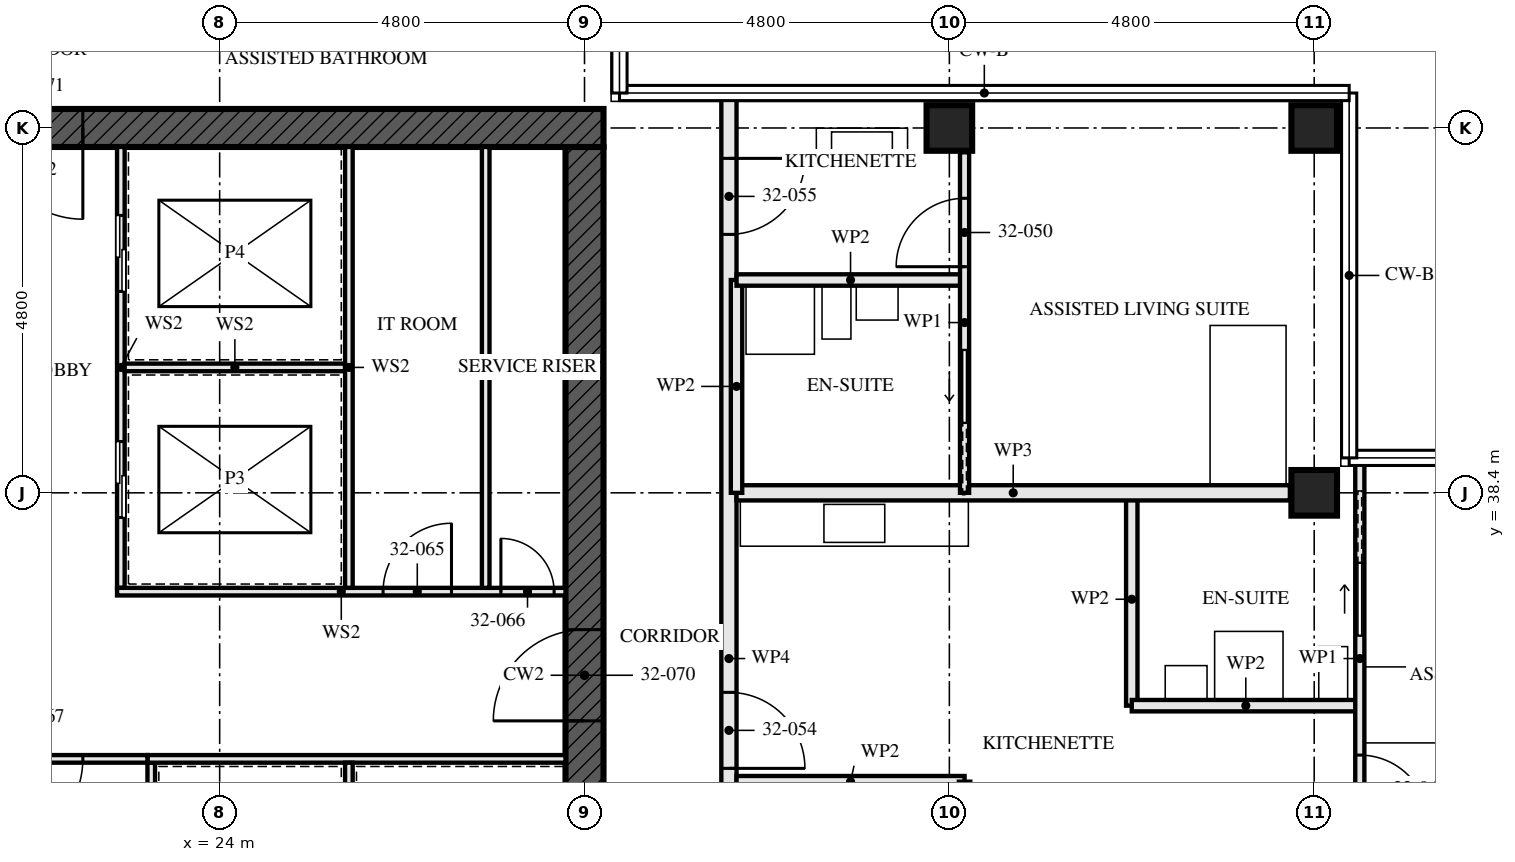
"""IFC4 building model, lengths in metres.
Left out: names, types, materials, properties, quantities, classifications, styles, units other than length and angle.
Written with IfcOpenShell. Run it as: python <this file> out.ifc"""

import sys

from ifc_helpers import new_model, si_unit, direction, frame, frame_2d, origin, origin_2d, place, context, subcontext, project, spatial, rectangle, hollow_rectangle, extrude, element, fill, save


model = new_model("IFC4")
c1 = context("Model", 3, precision=1e-05, world=origin(), true_north=direction((0.0, 1.0)))
c2 = subcontext(c1, "Body", "Model", "MODEL_VIEW")
j1 = project(units=[si_unit("LENGTHUNIT", "METRE"), si_unit("PLANEANGLEUNIT", "RADIAN")], contexts=[c1])
p1 = place(None, origin())
s1 = spatial("IfcSite", under=j1, at=p1, CompositionType="ELEMENT")
p2 = place(p1, origin())
s2 = spatial("IfcBuilding", under=s1, at=p2, CompositionType="ELEMENT")
p3 = place(p2, frame((0.0, 0.0, 119.0)))
s3 = spatial("IfcBuildingStorey", under=s2, at=p3, CompositionType="ELEMENT", Elevation=119.0)
for number, where, z_axis, x_axis in (
    (1, (33.6, 43.2, 0.0), (0.0, 0.0, 1.0), (0.0, 1.0, 0.0)),
    (2, (38.4, 38.4, 0.0), (0.0, 0.0, 1.0), (0.0, 1.0, 0.0)),
    (3, (38.4, 43.2, 0.0), (0.0, 0.0, 1.0), (0.0, 1.0, 0.0)),
):
    element("IfcColumn", number, at=place(p3, frame(where, z_axis=z_axis, x_axis=x_axis)), inside=s3, PredefinedType="COLUMN", context=c2, shape_type="SweptSolid", body=[
        extrude(hollow_rectangle(XDim=0.6, YDim=0.6, WallThickness=0.08, at=origin_2d()), origin(), (0.0, 0.0, 1.0), 3.5),
    ])
p4 = place(p3, frame((29.05, 43.2, -0.17), z_axis=(0.0, 0.0, 1.0), x_axis=(-1.0, 0.0, 0.0)))
e4 = element("IfcWall", 4, at=p4, inside=s3, PredefinedType="SHEAR", context=c2, shape_type="SweptSolid", body=[
    extrude(rectangle(XDim=14.9, YDim=0.5, at=frame_2d((7.45, 0.0))), origin(), (0.0, 0.0, 1.0), 3.5),
])
p5 = place(p4, frame((6.85, 0.0, 0.17)))
e5 = element("IfcOpeningElement", 5, at=p5, cuts=e4, PredefinedType="OPENING", context=c2, shape_type="SweptSolid", body=[
    extrude(rectangle(XDim=1.2, YDim=2.1, at=frame_2d((0.6, 1.05))), frame((0.0, 0.26, 0.0), z_axis=(0.0, -1.0, 0.0), x_axis=(1.0, 0.0, 0.0)), (0.0, 0.0, 1.0), 0.521),
])
p6 = place(p3, frame((28.8, 29.05, -0.17), z_axis=(0.0, 0.0, 1.0), x_axis=(0.0, 1.0, 0.0)))
e6 = element("IfcWall", 6, at=p6, inside=s3, PredefinedType="SHEAR", context=c2, shape_type="SweptSolid", body=[
    extrude(rectangle(XDim=13.9, YDim=0.5, at=frame_2d((6.95, 0.0))), origin(), (0.0, 0.0, 1.0), 3.5),
])
p7 = place(p6, frame((6.35, 0.0, 0.17)))
e7 = element("IfcOpeningElement", 7, at=p7, cuts=e6, PredefinedType="OPENING", context=c2, shape_type="SweptSolid", body=[
    extrude(rectangle(XDim=1.2, YDim=2.1, at=frame_2d((0.6, 1.05))), frame((0.0, 0.26, 0.0), z_axis=(0.0, -1.0, 0.0), x_axis=(1.0, 0.0, 0.0)), (0.0, 0.0, 1.0), 0.521),
])
p8 = place(p3, frame((33.8, 32.2, 0.0), z_axis=(0.0, 0.0, 1.0), x_axis=(0.0, 1.0, 0.0)))
e8 = element("IfcWall", 8, at=p8, inside=s3, PredefinedType="PARTITIONING", context=c2, shape_type="SweptSolid", body=[
    extrude(rectangle(XDim=2.4, YDim=0.15, at=frame_2d((1.2, 0.0))), origin(), (0.0, 0.0, 1.0), 2.55),
])
for number, where, z_axis, x_axis in (
    (9, (33.8, 34.6, 0.0), (0.0, 0.0, 1.0), (-1.0, 0.0, 0.0)),
    (10, (39.0, 35.6, 0.0), (0.0, 0.0, 1.0), (-1.0, 0.0, 0.0)),
):
    element("IfcWall", number, at=place(p3, frame(where, z_axis=z_axis, x_axis=x_axis)), inside=s3, PredefinedType="PARTITIONING", context=c2, shape_type="SweptSolid", body=[
        extrude(rectangle(XDim=3.0, YDim=0.15, at=frame_2d((1.5, 0.0))), origin(), (0.0, 0.0, 1.0), 3.33),
    ])
p9 = place(p3, frame((36.0, 35.6, 0.0), z_axis=(0.0, 0.0, 1.0), x_axis=(0.0, 1.0, 0.0)))
e11 = element("IfcWall", 11, at=p9, inside=s3, PredefinedType="PARTITIONING", context=c2, shape_type="SweptSolid", body=[
    extrude(rectangle(XDim=2.8, YDim=0.15, at=frame_2d((1.4, 0.0))), origin(), (0.0, 0.0, 1.0), 3.33),
])
p10 = place(p3, frame((39.0, 33.6, 0.0), z_axis=(0.0, 0.0, 1.0), x_axis=(0.0, 1.0, 0.0)))
e12 = element("IfcWall", 12, at=p10, inside=s3, PredefinedType="PARTITIONING", context=c2, shape_type="SweptSolid", body=[
    extrude(rectangle(XDim=5.24, YDim=0.12, at=frame_2d((2.62, 0.0))), origin(), (0.0, 0.0, 1.0), 2.32),
])
p11 = place(p10, frame((0.45, 0.0, 0.0)))
e13 = element("IfcOpeningElement", 13, at=p11, cuts=e12, PredefinedType="OPENING", context=c2, shape_type="SweptSolid", body=[
    extrude(rectangle(XDim=0.9, YDim=2.1, at=frame_2d((0.45, 1.05))), frame((0.0, 0.071, 0.0), z_axis=(0.0, -1.0, 0.0), x_axis=(1.0, 0.0, 0.0)), (0.0, 0.0, 1.0), 0.141),
])
p12 = place(p10, frame((2.925, 0.0, 0.0)))
e14 = element("IfcOpeningElement", 14, at=p12, cuts=e12, PredefinedType="OPENING", context=c2, shape_type="SweptSolid", body=[
    extrude(rectangle(XDim=0.95, YDim=2.1, at=frame_2d((0.475, 1.05))), frame((0.0, 0.071, 0.0), z_axis=(0.0, -1.0, 0.0), x_axis=(1.0, 0.0, 0.0)), (0.0, 0.0, 1.0), 0.141),
])
p13 = place(p3, frame((38.08, 38.4, 0.0), z_axis=(0.0, 0.0, 1.0), x_axis=(-1.0, 0.0, 0.0)))
e15 = element("IfcWall", 15, at=p13, inside=s3, PredefinedType="PARTITIONING", context=c2, shape_type="SweptSolid", body=[
    extrude(rectangle(XDim=7.28, YDim=0.2, at=frame_2d((3.64, 0.0))), origin(), (0.0, 0.0, 1.0), 2.55),
])
p14 = place(p3, frame((33.8, 41.2, 0.0), z_axis=(0.0, 0.0, 1.0), x_axis=(-1.0, 0.0, 0.0)))
e16 = element("IfcWall", 16, at=p14, inside=s3, PredefinedType="PARTITIONING", context=c2, shape_type="SweptSolid", body=[
    extrude(rectangle(XDim=3.0, YDim=0.15, at=frame_2d((1.5, 0.0))), origin(), (0.0, 0.0, 1.0), 3.33),
])
p15 = place(p3, frame((30.8, 38.4, 0.0), z_axis=(0.0, 0.0, 1.0), x_axis=(0.0, 1.0, 0.0)))
e17 = element("IfcWall", 17, at=p15, inside=s3, PredefinedType="PARTITIONING", context=c2, shape_type="SweptSolid", body=[
    extrude(rectangle(XDim=2.8, YDim=0.15, at=frame_2d((1.4, 0.0))), origin(), (0.0, 0.0, 1.0), 3.33),
])
p16 = place(p3, frame((33.8, 38.4, 0.0), z_axis=(0.0, 0.0, 1.0), x_axis=(0.0, 1.0, 0.0)))
e18 = element("IfcWall", 18, at=p16, inside=s3, PredefinedType="PARTITIONING", context=c2, shape_type="SweptSolid", body=[
    extrude(rectangle(XDim=4.48, YDim=0.12, at=frame_2d((2.24, 0.0))), origin(), (0.0, 0.0, 1.0), 3.33),
])
p17 = place(p16, frame((2.975, 0.0, 0.0)))
e19 = element("IfcOpeningElement", 19, at=p17, cuts=e18, PredefinedType="OPENING", context=c2, shape_type="SweptSolid", body=[
    extrude(rectangle(XDim=0.9, YDim=2.1, at=frame_2d((0.45, 1.05))), frame((0.0, 0.071, 0.0), z_axis=(0.0, -1.0, 0.0), x_axis=(1.0, 0.0, 0.0)), (0.0, 0.0, 1.0), 0.141),
])
p18 = place(p16, frame((0.925, 0.0, 0.0)))
e20 = element("IfcOpeningElement", 20, at=p18, cuts=e18, PredefinedType="OPENING", context=c2, shape_type="SweptSolid", body=[
    extrude(rectangle(XDim=0.95, YDim=2.1, at=frame_2d((0.475, 1.05))), frame((0.0, 0.071, 0.0), z_axis=(0.0, -1.0, 0.0), x_axis=(1.0, 0.0, 0.0)), (0.0, 0.0, 1.0), 0.141),
])
p19 = place(p3, frame((30.7, 28.8, 0.0), z_axis=(0.0, 0.0, 1.0), x_axis=(0.0, 1.0, 0.0)))
e21 = element("IfcWall", 21, at=p19, inside=s3, PredefinedType="PARTITIONING", context=c2, shape_type="SweptSolid", body=[
    extrude(rectangle(XDim=14.84, YDim=0.2, at=frame_2d((7.42, 0.0))), origin(), (0.0, 0.0, 1.0), 2.32),
])
p20 = place(p19, frame((1.4, 0.0, 0.0)))
e22 = element("IfcOpeningElement", 22, at=p20, cuts=e21, PredefinedType="OPENING", context=c2, shape_type="SweptSolid", body=[
    extrude(rectangle(XDim=1.0, YDim=2.1, at=frame_2d((0.5, 1.05))), frame((0.0, 0.111, 0.0), z_axis=(0.0, -1.0, 0.0), x_axis=(1.0, 0.0, 0.0)), (0.0, 0.0, 1.0), 0.221),
])
p21 = place(p19, frame((4.1, 0.0, 0.0)))
e23 = element("IfcOpeningElement", 23, at=p21, cuts=e21, PredefinedType="OPENING", context=c2, shape_type="SweptSolid", body=[
    extrude(rectangle(XDim=1.0, YDim=2.1, at=frame_2d((0.5, 1.05))), frame((0.0, 0.111, 0.0), z_axis=(0.0, -1.0, 0.0), x_axis=(1.0, 0.0, 0.0)), (0.0, 0.0, 1.0), 0.221),
])
p22 = place(p19, frame((5.975, 0.0, 0.0)))
e24 = element("IfcOpeningElement", 24, at=p22, cuts=e21, PredefinedType="OPENING", context=c2, shape_type="SweptSolid", body=[
    extrude(rectangle(XDim=1.0, YDim=2.1, at=frame_2d((0.5, 1.05))), frame((0.0, 0.111, 0.0), z_axis=(0.0, -1.0, 0.0), x_axis=(1.0, 0.0, 0.0)), (0.0, 0.0, 1.0), 0.221),
])
p23 = place(p19, frame((13.0, 0.0, 0.0)))
e25 = element("IfcOpeningElement", 25, at=p23, cuts=e21, PredefinedType="OPENING", context=c2, shape_type="SweptSolid", body=[
    extrude(rectangle(XDim=1.0, YDim=2.1, at=frame_2d((0.5, 1.05))), frame((0.0, 0.111, 0.0), z_axis=(0.0, -1.0, 0.0), x_axis=(1.0, 0.0, 0.0)), (0.0, 0.0, 1.0), 0.221),
])
p24 = place(p3, frame((27.5, 37.15, 0.0), z_axis=(0.0, 0.0, 1.0), x_axis=(0.0, 1.0, 0.0)))
e26 = element("IfcWall", 26, at=p24, inside=s3, PredefinedType="SOLIDWALL", context=c2, shape_type="SweptSolid", body=[
    extrude(rectangle(XDim=5.8, YDim=0.1, at=frame_2d((2.9, 0.0))), origin(), (0.0, 0.0, 1.0), 3.33),
])
p25 = place(p3, frame((22.7, 37.15, 0.0), z_axis=(0.0, 0.0, 1.0), x_axis=(0.0, 1.0, 0.0)))
e27 = element("IfcWall", 27, at=p25, inside=s3, PredefinedType="SOLIDWALL", context=c2, shape_type="SweptSolid", body=[
    extrude(rectangle(XDim=5.8, YDim=0.1, at=frame_2d((2.9, 0.0))), origin(), (0.0, 0.0, 1.0), 3.33),
])
p26 = place(p25, frame((0.925, 0.0, 0.0)))
e28 = element("IfcOpeningElement", 28, at=p26, cuts=e27, PredefinedType="OPENING", context=c2, shape_type="SweptSolid", body=[
    extrude(rectangle(XDim=1.0, YDim=2.1, at=frame_2d((0.5, 1.05))), frame((0.0, 0.061, 0.0), z_axis=(0.0, -1.0, 0.0), x_axis=(1.0, 0.0, 0.0)), (0.0, 0.0, 1.0), 0.121),
])
p27 = place(p25, frame((3.9, 0.0, 0.0)))
e29 = element("IfcOpeningElement", 29, at=p27, cuts=e27, PredefinedType="OPENING", context=c2, shape_type="SweptSolid", body=[
    extrude(rectangle(XDim=1.0, YDim=2.1, at=frame_2d((0.5, 1.05))), frame((0.0, 0.061, 0.0), z_axis=(0.0, -1.0, 0.0), x_axis=(1.0, 0.0, 0.0)), (0.0, 0.0, 1.0), 0.121),
])
p28 = place(p3, frame((23.1, 29.05, 0.0), z_axis=(0.0, 0.0, 1.0), x_axis=(0.0, 1.0, 0.0)))
e30 = element("IfcWall", 30, at=p28, inside=s3, PredefinedType="SOLIDWALL", context=c2, shape_type="SweptSolid", body=[
    extrude(rectangle(XDim=5.8, YDim=0.1, at=frame_2d((2.9, 0.0))), origin(), (0.0, 0.0, 1.0), 3.33),
])
p29 = place(p28, frame((1.0, 0.0, 0.0)))
e31 = element("IfcOpeningElement", 31, at=p29, cuts=e30, PredefinedType="OPENING", context=c2, shape_type="SweptSolid", body=[
    extrude(rectangle(XDim=0.7, YDim=2.1, at=frame_2d((0.35, 1.05))), frame((0.0, 0.061, 0.0), z_axis=(0.0, -1.0, 0.0), x_axis=(1.0, 0.0, 0.0)), (0.0, 0.0, 1.0), 0.121),
])
p30 = place(p3, frame((23.05, 34.9, 0.0), z_axis=(0.0, 0.0, 1.0), x_axis=(1.0, 0.0, 0.0)))
e32 = element("IfcWall", 32, at=p30, inside=s3, PredefinedType="SOLIDWALL", context=c2, shape_type="SweptSolid", body=[
    extrude(rectangle(XDim=5.5, YDim=0.1, at=frame_2d((2.75, 0.0))), origin(), (0.0, 0.0, 1.0), 3.33),
])
p31 = place(p3, frame((22.65, 37.1, 0.0), z_axis=(0.0, 0.0, 1.0), x_axis=(1.0, 0.0, 0.0)))
e33 = element("IfcWall", 33, at=p31, inside=s3, PredefinedType="SOLIDWALL", context=c2, shape_type="SweptSolid", body=[
    extrude(rectangle(XDim=5.9, YDim=0.1, at=frame_2d((2.95, 0.0))), origin(), (0.0, 0.0, 1.0), 3.33),
])
p32 = place(p31, frame((3.5, 0.0, 0.0)))
e34 = element("IfcOpeningElement", 34, at=p32, cuts=e33, PredefinedType="OPENING", context=c2, shape_type="SweptSolid", body=[
    extrude(rectangle(XDim=0.9, YDim=2.1, at=frame_2d((0.45, 1.05))), frame((0.0, 0.061, 0.0), z_axis=(0.0, -1.0, 0.0), x_axis=(1.0, 0.0, 0.0)), (0.0, 0.0, 1.0), 0.121),
])
p33 = place(p31, frame((5.05, 0.0, 0.0)))
e35 = element("IfcOpeningElement", 35, at=p33, cuts=e33, PredefinedType="OPENING", context=c2, shape_type="SweptSolid", body=[
    extrude(rectangle(XDim=0.7, YDim=2.1, at=frame_2d((0.35, 1.05))), frame((0.0, 0.061, 0.0), z_axis=(0.0, -1.0, 0.0), x_axis=(1.0, 0.0, 0.0)), (0.0, 0.0, 1.0), 0.121),
])
p34 = place(p3, frame((20.55, 34.9, 0.0), z_axis=(0.0, 0.0, 1.0), x_axis=(1.0, 0.0, 0.0)))
e36 = element("IfcWall", 36, at=p34, inside=s3, PredefinedType="SOLIDWALL", context=c2, shape_type="SweptSolid", body=[
    extrude(rectangle(XDim=2.5, YDim=0.1, at=frame_2d((1.25, 0.0))), origin(), (0.0, 0.0, 1.0), 3.33),
])
p35 = place(p34, frame((0.45, 0.0, 0.0)))
e37 = element("IfcOpeningElement", 37, at=p35, cuts=e36, PredefinedType="OPENING", context=c2, shape_type="SweptSolid", body=[
    extrude(rectangle(XDim=1.2, YDim=2.1, at=frame_2d((0.6, 1.05))), frame((0.0, 0.061, 0.0), z_axis=(0.0, -1.0, 0.0), x_axis=(1.0, 0.0, 0.0)), (0.0, 0.0, 1.0), 0.121),
])
p36 = place(p3, frame((22.75, 40.05, 0.0), z_axis=(0.0, 0.0, 1.0), x_axis=(1.0, 0.0, 0.0)))
e38 = element("IfcWall", 38, at=p36, inside=s3, PredefinedType="SOLIDWALL", context=c2, shape_type="SweptSolid", body=[
    extrude(rectangle(XDim=2.9, YDim=0.1, at=frame_2d((1.45, 0.0))), origin(), (0.0, 0.0, 1.0), 3.33),
])
p37 = place(p3, frame((25.7, 37.15, 0.0), z_axis=(0.0, 0.0, 1.0), x_axis=(0.0, 1.0, 0.0)))
e39 = element("IfcWall", 39, at=p37, inside=s3, PredefinedType="SOLIDWALL", context=c2, shape_type="SweptSolid", body=[
    extrude(rectangle(XDim=5.8, YDim=0.1, at=frame_2d((2.9, 0.0))), origin(), (0.0, 0.0, 1.0), 3.33),
])
p38 = place(p3, frame((25.7, 31.95, 0.0), z_axis=(0.0, 0.0, 1.0), x_axis=(0.0, 1.0, 0.0)))
e40 = element("IfcWall", 40, at=p38, inside=s3, PredefinedType="SOLIDWALL", context=c2, shape_type="SweptSolid", body=[
    extrude(rectangle(XDim=2.9, YDim=0.1, at=frame_2d((1.45, 0.0))), origin(), (0.0, 0.0, 1.0), 3.33),
])
p39 = place(p11, frame((0.9, 0.0, 0.0), z_axis=(0.0, 0.0, 1.0), x_axis=(-1.0, 0.0, 0.0)))
e41 = element("IfcDoor", 41, at=p39, inside=s3, OperationType="SINGLE_SWING_LEFT", PredefinedType="DOOR", context=c2, shape_type="SweptSolid", body=[
    extrude(rectangle(XDim=0.9, YDim=2.1, at=frame_2d((0.45, 1.05))), frame((0.0, 0.022, 0.0), z_axis=(0.0, -1.0, 0.0), x_axis=(1.0, 0.0, 0.0)), (0.0, 0.0, 1.0), 0.044),
])
fill(e13, e41)
p40 = place(p12, origin())
e42 = element("IfcDoor", 42, at=p40, inside=s3, OperationType="SLIDING_TO_LEFT", PredefinedType="DOOR", context=c2, shape_type="SweptSolid", body=[
    extrude(rectangle(XDim=0.95, YDim=2.1, at=frame_2d((0.475, 1.05))), frame((0.0, 0.022, 0.0), z_axis=(0.0, -1.0, 0.0), x_axis=(1.0, 0.0, 0.0)), (0.0, 0.0, 1.0), 0.044),
])
fill(e14, e42)
p41 = place(p17, origin())
e43 = element("IfcDoor", 43, at=p41, inside=s3, OperationType="SINGLE_SWING_RIGHT", PredefinedType="DOOR", context=c2, shape_type="SweptSolid", body=[
    extrude(rectangle(XDim=0.9, YDim=2.1, at=frame_2d((0.45, 1.05))), frame((0.0, 0.022, 0.0), z_axis=(0.0, -1.0, 0.0), x_axis=(1.0, 0.0, 0.0)), (0.0, 0.0, 1.0), 0.044),
])
fill(e19, e43)
p42 = place(p18, origin())
e44 = element("IfcDoor", 44, at=p42, inside=s3, OperationType="SLIDING_TO_RIGHT", PredefinedType="DOOR", context=c2, shape_type="SweptSolid", body=[
    extrude(rectangle(XDim=0.95, YDim=2.1, at=frame_2d((0.475, 1.05))), frame((0.0, 0.022, 0.0), z_axis=(0.0, -1.0, 0.0), x_axis=(1.0, 0.0, 0.0)), (0.0, 0.0, 1.0), 0.044),
])
fill(e20, e44)
p43 = place(p22, frame((1.0, 0.0, 0.0), z_axis=(0.0, 0.0, 1.0), x_axis=(-1.0, 0.0, 0.0)))
e45 = element("IfcDoor", 45, at=p43, inside=s3, OperationType="SINGLE_SWING_LEFT", PredefinedType="DOOR", context=c2, shape_type="SweptSolid", body=[
    extrude(rectangle(XDim=1.0, YDim=2.1, at=frame_2d((0.5, 1.05))), frame((0.0, 0.027, 0.0), z_axis=(0.0, -1.0, 0.0), x_axis=(1.0, 0.0, 0.0)), (0.0, 0.0, 1.0), 0.054),
])
fill(e24, e45)
p44 = place(p23, frame((1.0, 0.0, 0.0), z_axis=(0.0, 0.0, 1.0), x_axis=(-1.0, 0.0, 0.0)))
e46 = element("IfcDoor", 46, at=p44, inside=s3, OperationType="SINGLE_SWING_RIGHT", PredefinedType="DOOR", context=c2, shape_type="SweptSolid", body=[
    extrude(rectangle(XDim=1.0, YDim=2.1, at=frame_2d((0.5, 1.05))), frame((0.0, 0.027, 0.0), z_axis=(0.0, -1.0, 0.0), x_axis=(1.0, 0.0, 0.0)), (0.0, 0.0, 1.0), 0.054),
])
fill(e25, e46)
p45 = place(p26, origin())
e47 = element("IfcDoor", 47, at=p45, inside=s3, OperationType="SLIDING_TO_LEFT", PredefinedType="DOOR", context=c2, shape_type="SweptSolid", body=[
    extrude(rectangle(XDim=1.0, YDim=2.1, at=frame_2d((0.5, 1.05))), frame((0.0, 0.05, 0.0), z_axis=(0.0, -1.0, 0.0), x_axis=(1.0, 0.0, 0.0)), (0.0, 0.0, 1.0), 0.1),
])
fill(e28, e47)
p46 = place(p27, origin())
e48 = element("IfcDoor", 48, at=p46, inside=s3, OperationType="SLIDING_TO_LEFT", PredefinedType="DOOR", context=c2, shape_type="SweptSolid", body=[
    extrude(rectangle(XDim=1.0, YDim=2.1, at=frame_2d((0.5, 1.05))), frame((0.0, 0.05, 0.0), z_axis=(0.0, -1.0, 0.0), x_axis=(1.0, 0.0, 0.0)), (0.0, 0.0, 1.0), 0.1),
])
fill(e29, e48)
p47 = place(p32, origin())
e49 = element("IfcDoor", 49, at=p47, inside=s3, OperationType="SINGLE_SWING_LEFT", PredefinedType="DOOR", context=c2, shape_type="SweptSolid", body=[
    extrude(rectangle(XDim=0.9, YDim=2.1, at=frame_2d((0.45, 1.05))), frame((0.0, 0.027, 0.0), z_axis=(0.0, -1.0, 0.0), x_axis=(1.0, 0.0, 0.0)), (0.0, 0.0, 1.0), 0.054),
])
fill(e34, e49)
p48 = place(p33, origin())
e50 = element("IfcDoor", 50, at=p48, inside=s3, OperationType="SINGLE_SWING_RIGHT", PredefinedType="DOOR", context=c2, shape_type="SweptSolid", body=[
    extrude(rectangle(XDim=0.7, YDim=2.1, at=frame_2d((0.35, 1.05))), frame((0.0, 0.027, 0.0), z_axis=(0.0, -1.0, 0.0), x_axis=(1.0, 0.0, 0.0)), (0.0, 0.0, 1.0), 0.054),
])
fill(e35, e50)
p49 = place(p35, frame((1.2, 0.0, 0.0), z_axis=(0.0, 0.0, 1.0), x_axis=(-1.0, 0.0, 0.0)))
e51 = element("IfcDoor", 51, at=p49, inside=s3, OperationType="SINGLE_SWING_LEFT", PredefinedType="DOOR", context=c2, shape_type="SweptSolid", body=[
    extrude(rectangle(XDim=1.2, YDim=2.1, at=frame_2d((0.6, 1.05))), frame((0.0, 0.027, 0.0), z_axis=(0.0, -1.0, 0.0), x_axis=(1.0, 0.0, 0.0)), (0.0, 0.0, 1.0), 0.054),
])
fill(e37, e51)
p50 = place(p7, origin())
e52 = element("IfcDoor", 52, at=p50, inside=s3, OperationType="SINGLE_SWING_LEFT", PredefinedType="DOOR", context=c2, shape_type="SweptSolid", body=[
    extrude(rectangle(XDim=1.2, YDim=2.1, at=frame_2d((0.6, 1.05))), frame((0.0, 0.027, 0.0), z_axis=(0.0, -1.0, 0.0), x_axis=(1.0, 0.0, 0.0)), (0.0, 0.0, 1.0), 0.054),
])
fill(e7, e52)
p51 = place(p5, origin())
e53 = element("IfcDoor", 53, at=p51, inside=s3, OperationType="SINGLE_SWING_LEFT", PredefinedType="DOOR", context=c2, shape_type="SweptSolid", body=[
    extrude(rectangle(XDim=1.2, YDim=2.1, at=frame_2d((0.6, 1.05))), frame((0.0, 0.027, 0.0), z_axis=(0.0, -1.0, 0.0), x_axis=(1.0, 0.0, 0.0)), (0.0, 0.0, 1.0), 0.054),
])
fill(e5, e53)
save(model, sys.argv[1])
